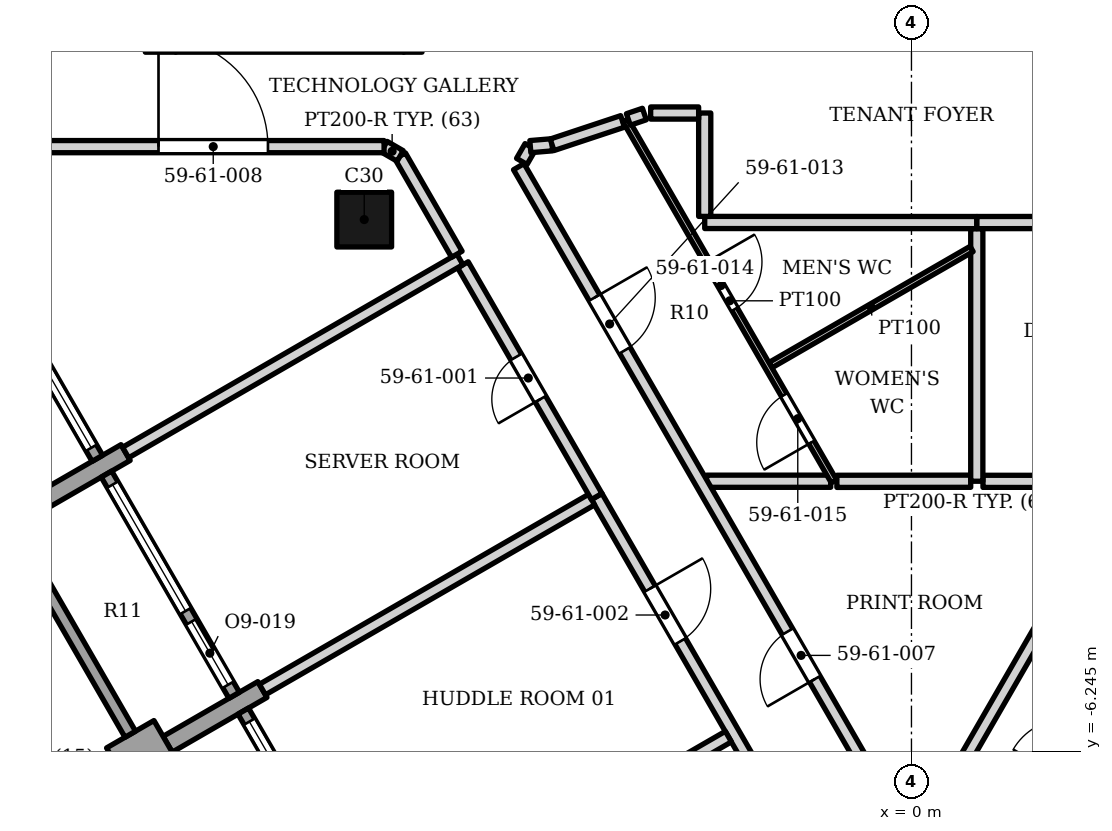
"""IFC4 building model, lengths in metres.
Left out: names, types, materials, properties, quantities, classifications, styles, units other than length and angle.
Written with IfcOpenShell. Run it as: python <this file> out.ifc"""

import sys

from ifc_helpers import new_model, si_unit, direction, frame, frame_2d, origin, origin_2d, place, context, subcontext, project, spatial, rectangle, extrude, element, fill, save


model = new_model("IFC4")
c1 = context("Model", 3, precision=1e-05, world=origin(), true_north=direction((0.0, 1.0)))
c2 = subcontext(c1, "Body", "Model", "MODEL_VIEW")
j1 = project(units=[si_unit("LENGTHUNIT", "METRE"), si_unit("PLANEANGLEUNIT", "RADIAN")], contexts=[c1])
p1 = place(None, origin())
s1 = spatial("IfcSite", under=j1, at=p1, CompositionType="ELEMENT")
p2 = place(p1, origin())
s2 = spatial("IfcBuilding", under=s1, at=p2, CompositionType="ELEMENT")
p3 = place(p2, frame((0.0, 0.0, 248.2)))
s3 = spatial("IfcBuildingStorey", under=s2, at=p3, CompositionType="ELEMENT", Elevation=248.2)
p4 = place(p3, frame((-9.0, 2.5, 0.0), z_axis=(0.0, 0.0, 1.0), x_axis=(1.0, 0.0, 0.0)))
e1 = element("IfcColumn", 1, at=p4, inside=s3, PredefinedType="COLUMN", context=c2, shape_type="SweptSolid", body=[
    extrude(rectangle(XDim=0.9, YDim=0.9, at=origin_2d()), origin(), (0.0, 0.0, 1.0), 3.9),
])
p5 = place(p3, frame((-14.483, -2.231, 0.0), z_axis=(0.0, 0.0, 1.0), x_axis=(0.866047807691, 0.499961193289, 0.0)))
e2 = element("IfcWall", 2, at=p5, inside=s3, PredefinedType="SOLIDWALL", context=c2, shape_type="SweptSolid", body=[
    extrude(rectangle(XDim=1.8, YDim=0.3, at=frame_2d((0.9, 0.0))), origin(), (0.0, 0.0, 1.0), 3.0),
])
p6 = place(p3, frame((-13.012, -6.578, 0.0), z_axis=(0.0, 0.0, 1.0), x_axis=(0.866013897511, 0.50001992892, 0.0)))
e3 = element("IfcWall", 3, at=p6, inside=s3, PredefinedType="SOLIDWALL", context=c2, shape_type="SweptSolid", body=[
    extrude(rectangle(XDim=0.9, YDim=0.9, at=frame_2d((0.45, 0.0))), origin(), (0.0, 0.0, 1.0), 3.0),
])
p7 = place(p3, frame((-12.233, -6.128, 0.0), z_axis=(0.0, 0.0, 1.0), x_axis=(0.865989075817, 0.500062916607, 0.0)))
e4 = element("IfcWall", 4, at=p7, inside=s3, PredefinedType="SOLIDWALL", context=c2, shape_type="SweptSolid", body=[
    extrude(rectangle(XDim=1.8, YDim=0.3, at=frame_2d((0.9, 0.0))), origin(), (0.0, 0.0, 1.0), 3.0),
])
p8 = place(p3, frame((-15.489, 2.211, 0.0), z_axis=(0.0, 0.0, 1.0), x_axis=(0.500027713859, -0.866009402589, 0.0)))
e5 = element("IfcWall", 5, at=p8, inside=s3, PredefinedType="ELEMENTEDWALL", context=c2, shape_type="SweptSolid", body=[
    extrude(rectangle(XDim=4.2, YDim=0.2, at=frame_2d((2.1, 0.0))), origin(), (0.0, 0.0, 1.0), 3.0),
])
p9 = place(p8, frame((0.2, 0.0, 0.45)))
e6 = element("IfcOpeningElement", 6, at=p9, cuts=e5, PredefinedType="OPENING", context=c2, shape_type="SweptSolid", body=[
    extrude(rectangle(XDim=3.8, YDim=2.25, at=frame_2d((1.9, 1.125))), frame((0.0, 0.11, 0.0), z_axis=(0.0, -1.0, 0.0), x_axis=(1.0, 0.0, 0.0)), (0.0, 0.0, 1.0), 0.22),
])
p10 = place(p3, frame((-14.648, -2.846, 0.0), z_axis=(0.0, 0.0, 1.0), x_axis=(0.500012057535, -0.866018442252, 0.0)))
e7 = element("IfcWall", 7, at=p10, inside=s3, PredefinedType="SOLIDWALL", context=c2, shape_type="SweptSolid", body=[
    extrude(rectangle(XDim=3.6, YDim=0.2, at=frame_2d((1.8, 0.0))), origin(), (0.0, 0.0, 1.0), 3.0),
])
p11 = place(p3, frame((-13.239, -1.686, 0.0), z_axis=(0.0, 0.0, 1.0), x_axis=(0.500002543286, -0.866023935413, 0.0)))
e8 = element("IfcWall", 8, at=p11, inside=s3, PredefinedType="ELEMENTEDWALL", context=c2, shape_type="SweptSolid", body=[
    extrude(rectangle(XDim=4.2, YDim=0.2, at=frame_2d((2.1, 0.0))), origin(), (0.0, 0.0, 1.0), 3.0),
])
p12 = place(p11, frame((0.2, 0.0, 0.45)))
e9 = element("IfcOpeningElement", 9, at=p12, cuts=e8, PredefinedType="OPENING", context=c2, shape_type="SweptSolid", body=[
    extrude(rectangle(XDim=2.4, YDim=2.25, at=frame_2d((1.2, 1.125))), frame((0.0, 0.11, 0.0), z_axis=(0.0, -1.0, 0.0), x_axis=(1.0, 0.0, 0.0)), (0.0, 0.0, 1.0), 0.22),
])
p13 = place(p11, frame((2.8, 0.0, 0.0)))
e10 = element("IfcOpeningElement", 10, at=p13, cuts=e8, PredefinedType="OPENING", context=c2, shape_type="SweptSolid", body=[
    extrude(rectangle(XDim=1.2, YDim=2.7, at=frame_2d((0.6, 1.35))), frame((0.0, 0.11, 0.0), z_axis=(0.0, -1.0, 0.0), x_axis=(1.0, 0.0, 0.0)), (0.0, 0.0, 1.0), 0.22),
])
p14 = place(p3, frame((-10.989, -5.583, 0.0), z_axis=(0.0, 0.0, 1.0), x_axis=(0.500027713859, -0.866009402589, 0.0)))
e11 = element("IfcWall", 11, at=p14, inside=s3, PredefinedType="ELEMENTEDWALL", context=c2, shape_type="SweptSolid", body=[
    extrude(rectangle(XDim=4.2, YDim=0.2, at=frame_2d((2.1, 0.0))), origin(), (0.0, 0.0, 1.0), 3.0),
])
p15 = place(p14, frame((0.2, 0.0, 0.45)))
e12 = element("IfcOpeningElement", 12, at=p15, cuts=e11, PredefinedType="OPENING", context=c2, shape_type="SweptSolid", body=[
    extrude(rectangle(XDim=3.8, YDim=2.25, at=frame_2d((1.9, 1.125))), frame((0.0, 0.11, 0.0), z_axis=(0.0, -1.0, 0.0), x_axis=(1.0, 0.0, 0.0)), (0.0, 0.0, 1.0), 0.22),
])
p16 = place(p3, frame((-5.177, -2.054, 0.0), z_axis=(0.0, 0.0, 1.0), x_axis=(0.499987206771, -0.866032789833, 0.0)))
e13 = element("IfcWall", 13, at=p16, inside=s3, PredefinedType="PARTITIONING", context=c2, shape_type="SweptSolid", body=[
    extrude(rectangle(XDim=9.26, YDim=0.2, at=frame_2d((4.63, 0.0))), origin(), (0.0, 0.0, 1.0), 2.884),
])
p17 = place(p16, frame((1.75, 0.0, 0.0)))
e14 = element("IfcOpeningElement", 14, at=p17, cuts=e13, PredefinedType="OPENING", context=c2, shape_type="SweptSolid", body=[
    extrude(rectangle(XDim=1.0, YDim=2.1, at=frame_2d((0.5, 1.05))), frame((0.0, 0.11, 0.0), z_axis=(0.0, -1.0, 0.0), x_axis=(1.0, 0.0, 0.0)), (0.0, 0.0, 1.0), 0.22),
])
p18 = place(p16, frame((6.35, 0.0, 0.0)))
e15 = element("IfcOpeningElement", 15, at=p18, cuts=e13, PredefinedType="OPENING", context=c2, shape_type="SweptSolid", body=[
    extrude(rectangle(XDim=0.8, YDim=2.1, at=frame_2d((0.4, 1.05))), frame((0.0, 0.11, 0.0), z_axis=(0.0, -1.0, 0.0), x_axis=(1.0, 0.0, 0.0)), (0.0, 0.0, 1.0), 0.22),
])
p19 = place(p3, frame((0.217, -7.532, 0.0), z_axis=(0.0, 0.0, 1.0), x_axis=(0.499766665369, 0.866160077691, 0.0)))
e16 = element("IfcWall", 16, at=p19, inside=s3, PredefinedType="PARTITIONING", context=c2, shape_type="SweptSolid", body=[
    extrude(rectangle(XDim=12.588, YDim=0.2, at=frame_2d((6.294, 0.0))), origin(), (0.0, 0.0, 1.0), 2.884),
])
p20 = place(p19, frame((9.201, 0.0, 0.0)))
e17 = element("IfcOpeningElement", 17, at=p20, cuts=e16, PredefinedType="OPENING", context=c2, shape_type="SweptSolid", body=[
    extrude(rectangle(XDim=0.8, YDim=2.1, at=frame_2d((0.4, 1.05))), frame((0.0, 0.11, 0.0), z_axis=(0.0, -1.0, 0.0), x_axis=(1.0, 0.0, 0.0)), (0.0, 0.0, 1.0), 0.22),
])
p21 = place(p3, frame((-8.424, -9.125, 0.0), z_axis=(0.0, 0.0, 1.0), x_axis=(0.866180383398, 0.499731471309, 0.0)))
e18 = element("IfcWall", 18, at=p21, inside=s3, PredefinedType="PARTITIONING", context=c2, shape_type="SweptSolid", body=[
    extrude(rectangle(XDim=6.25, YDim=0.2, at=frame_2d((3.125, 0.0))), origin(), (0.0, 0.0, 1.0), 2.884),
])
p22 = place(p3, frame((1.713, -8.144, 0.0), z_axis=(0.0, 0.0, 1.0), x_axis=(0.499986217557, 0.866033360935, 0.0)))
e19 = element("IfcWall", 19, at=p22, inside=s3, PredefinedType="PARTITIONING", context=c2, shape_type="SweptSolid", body=[
    extrude(rectangle(XDim=4.3, YDim=0.2, at=frame_2d((2.15, 0.0))), origin(), (0.0, 0.0, 1.0), 3.73),
])
p23 = place(p22, frame((1.65, 0.0, 0.0)))
e20 = element("IfcOpeningElement", 20, at=p23, cuts=e19, PredefinedType="OPENING", context=c2, shape_type="SweptSolid", body=[
    extrude(rectangle(XDim=1.0, YDim=2.1, at=frame_2d((0.5, 1.05))), frame((0.0, 0.11, 0.0), z_axis=(0.0, -1.0, 0.0), x_axis=(1.0, 0.0, 0.0)), (0.0, 0.0, 1.0), 0.22),
])
p24 = place(p3, frame((-10.674, -5.229, 0.0), z_axis=(0.0, 0.0, 1.0), x_axis=(0.866163474566, 0.4997607781, 0.0)))
e21 = element("IfcWall", 21, at=p24, inside=s3, PredefinedType="PARTITIONING", context=c2, shape_type="SweptSolid", body=[
    extrude(rectangle(XDim=6.25, YDim=0.2, at=frame_2d((3.125, 0.0))), origin(), (0.0, 0.0, 1.0), 3.052),
])
p25 = place(p3, frame((-7.377, 1.756, 0.0), z_axis=(0.0, 0.0, 1.0), x_axis=(0.50001224981, -0.866018331238, 0.0)))
e22 = element("IfcWall", 22, at=p25, inside=s3, PredefinedType="PARTITIONING", context=c2, shape_type="SweptSolid", body=[
    extrude(rectangle(XDim=4.4, YDim=0.2, at=frame_2d((2.2, 0.0))), origin(), (0.0, 0.0, 1.0), 3.73),
])
p26 = place(p25, frame((1.75, 0.0, 0.0)))
e23 = element("IfcOpeningElement", 23, at=p26, cuts=e22, PredefinedType="OPENING", context=c2, shape_type="SweptSolid", body=[
    extrude(rectangle(XDim=0.8, YDim=2.1, at=frame_2d((0.4, 1.05))), frame((0.0, 0.11, 0.0), z_axis=(0.0, -1.0, 0.0), x_axis=(1.0, 0.0, 0.0)), (0.0, 0.0, 1.0), 0.22),
])
p27 = place(p3, frame((1.176, -1.805, 0.0), z_axis=(0.0, 0.0, 1.0), x_axis=(0.999999709909, -0.000761697276, 0.0)))
e24 = element("IfcWall", 24, at=p27, inside=s3, PredefinedType="PARTITIONING", context=c2, shape_type="SweptSolid", body=[
    extrude(rectangle(XDim=2.244, YDim=0.2, at=frame_2d((1.122, 0.0))), origin(), (0.0, 0.0, 1.0), 3.73),
])
p28 = place(p3, frame((-3.37, -1.803, 0.0), z_axis=(0.0, 0.0, 1.0), x_axis=(0.999999992849, 0.000119588614, 0.0)))
e25 = element("IfcWall", 25, at=p28, inside=s3, PredefinedType="PARTITIONING", context=c2, shape_type="SweptSolid", body=[
    extrude(rectangle(XDim=2.042, YDim=0.2, at=frame_2d((1.021, 0.0))), origin(), (0.0, 0.0, 1.0), 3.73),
])
p29 = place(p3, frame((-1.227, -1.805, 0.0), z_axis=(0.0, 0.0, 1.0), x_axis=(0.999999698604, 0.000776397282, 0.0)))
e26 = element("IfcWall", 26, at=p29, inside=s3, PredefinedType="PARTITIONING", context=c2, shape_type="SweptSolid", body=[
    extrude(rectangle(XDim=2.201, YDim=0.2, at=frame_2d((1.101, 0.0))), origin(), (0.0, 0.0, 1.0), 3.73),
])
p30 = place(p3, frame((1.074, -1.803, 0.0), z_axis=(0.0, 0.0, 1.0), x_axis=(0.0, 1.0, 0.0)))
e27 = element("IfcWall", 27, at=p30, inside=s3, PredefinedType="PARTITIONING", context=c2, shape_type="SweptSolid", body=[
    extrude(rectangle(XDim=4.154, YDim=0.2, at=frame_2d((2.077, 0.0))), origin(), (0.0, 0.0, 1.0), 3.73),
])
p31 = place(p3, frame((-12.925, -1.331, 0.0), z_axis=(0.0, 0.0, 1.0), x_axis=(0.865907634831, 0.500203926355, 0.0)))
e28 = element("IfcWall", 28, at=p31, inside=s3, PredefinedType="PARTITIONING", context=c2, shape_type="SweptSolid", body=[
    extrude(rectangle(XDim=6.349, YDim=0.2, at=frame_2d((3.175, 0.0))), origin(), (0.0, 0.0, 1.0), 3.052),
])
p32 = place(p3, frame((-8.409, 3.546, 0.0), z_axis=(0.0, 0.0, 1.0), x_axis=(0.499446790572, -0.866344563893, 0.0)))
e29 = element("IfcWall", 29, at=p32, inside=s3, PredefinedType="PARTITIONING", context=c2, shape_type="SweptSolid", body=[
    extrude(rectangle(XDim=1.866, YDim=0.2, at=frame_2d((0.933, 0.0))), origin(), (0.0, 0.0, 1.0), 3.73),
])
p33 = place(p3, frame((-2.32, 0.106, 0.0), z_axis=(0.0, 0.0, 1.0), x_axis=(0.866013238859, 0.500021069677, 0.0)))
e30 = element("IfcWall", 30, at=p33, inside=s3, PredefinedType="PARTITIONING", context=c2, shape_type="SweptSolid", body=[
    extrude(rectangle(XDim=3.822, YDim=0.1, at=frame_2d((1.911, 0.0))), origin(), (0.0, 0.0, 1.0), 2.884),
])
p34 = place(p3, frame((-3.4, 2.452, 0.0), z_axis=(0.0, 0.0, 1.0), x_axis=(0.999999927065, -0.000381929261, 0.0)))
e31 = element("IfcWall", 31, at=p34, inside=s3, PredefinedType="PARTITIONING", context=c2, shape_type="SweptSolid", body=[
    extrude(rectangle(XDim=4.475, YDim=0.2, at=frame_2d((2.237, 0.0))), origin(), (0.0, 0.0, 1.0), 3.73),
])
p35 = place(p3, frame((1.076, 2.451, 0.0), z_axis=(0.0, 0.0, 1.0), x_axis=(0.999999729558, 0.000735448425, 0.0)))
e32 = element("IfcWall", 32, at=p35, inside=s3, PredefinedType="PARTITIONING", context=c2, shape_type="SweptSolid", body=[
    extrude(rectangle(XDim=2.324, YDim=0.2, at=frame_2d((1.162, 0.0))), origin(), (0.0, 0.0, 1.0), 3.73),
])
p36 = place(p3, frame((-3.4, 4.252, 0.0), z_axis=(0.0, 0.0, 1.0), x_axis=(0.0, -1.0, 0.0)))
e33 = element("IfcWall", 33, at=p36, inside=s3, PredefinedType="PARTITIONING", context=c2, shape_type="SweptSolid", body=[
    extrude(rectangle(XDim=1.7, YDim=0.2, at=frame_2d((0.85, 0.0))), origin(), (0.0, 0.0, 1.0), 3.73),
])
p37 = place(p3, frame((-6.458, 3.37, 0.0), z_axis=(0.0, 0.0, 1.0), x_axis=(0.500262411632, -0.86587384734, 0.0)))
e34 = element("IfcWall", 34, at=p37, inside=s3, PredefinedType="PARTITIONING", context=c2, shape_type="SweptSolid", body=[
    extrude(rectangle(XDim=12.589, YDim=0.2, at=frame_2d((6.294, 0.0))), origin(), (0.0, 0.0, 1.0), 2.884),
])
p38 = place(p37, frame((8.832, 0.0, 0.0)))
e35 = element("IfcOpeningElement", 35, at=p38, cuts=e34, PredefinedType="OPENING", context=c2, shape_type="SweptSolid", body=[
    extrude(rectangle(XDim=0.9, YDim=2.1, at=frame_2d((0.45, 1.05))), frame((0.0, 0.11, 0.0), z_axis=(0.0, -1.0, 0.0), x_axis=(1.0, 0.0, 0.0)), (0.0, 0.0, 1.0), 0.22),
])
p39 = place(p37, frame((2.488, 0.0, 0.0)))
e36 = element("IfcOpeningElement", 36, at=p39, cuts=e34, PredefinedType="OPENING", context=c2, shape_type="SweptSolid", body=[
    extrude(rectangle(XDim=1.0, YDim=2.1, at=frame_2d((0.5, 1.05))), frame((0.0, 0.11, 0.0), z_axis=(0.0, -1.0, 0.0), x_axis=(1.0, 0.0, 0.0)), (0.0, 0.0, 1.0), 0.22),
])
p40 = place(p3, frame((-8.674, 3.699, 0.0), z_axis=(0.0, 0.0, 1.0), x_axis=(0.865826662844, -0.500344071524, 0.0)))
e37 = element("IfcWall", 37, at=p40, inside=s3, PredefinedType="PARTITIONING", context=c2, shape_type="SweptSolid", body=[
    extrude(rectangle(XDim=0.306, YDim=0.2, at=frame_2d((0.153, 0.0))), origin(), (0.0, 0.0, 1.0), 3.73),
])
p41 = place(p3, frame((-14.293, 3.699, 0.0), z_axis=(0.0, 0.0, 1.0), x_axis=(1.0, 0.0, 0.0)))
e38 = element("IfcWall", 38, at=p41, inside=s3, PredefinedType="PARTITIONING", context=c2, shape_type="SweptSolid", body=[
    extrude(rectangle(XDim=5.619, YDim=0.2, at=frame_2d((2.81, 0.0))), origin(), (0.0, 0.0, 1.0), 3.202),
])
p42 = place(p41, frame((1.91, 0.0, 0.0)))
e39 = element("IfcOpeningElement", 39, at=p42, cuts=e38, PredefinedType="OPENING", context=c2, shape_type="SweptSolid", body=[
    extrude(rectangle(XDim=1.8, YDim=2.4, at=frame_2d((0.9, 1.2))), frame((0.0, 0.11, 0.0), z_axis=(0.0, -1.0, 0.0), x_axis=(1.0, 0.0, 0.0)), (0.0, 0.0, 1.0), 0.22),
])
p43 = place(p3, frame((-6.408, 3.457, 0.0), z_axis=(0.0, 0.0, 1.0), x_axis=(0.499973348067, 0.866040790738, 0.0)))
e40 = element("IfcWall", 40, at=p43, inside=s3, PredefinedType="PARTITIONING", context=c2, shape_type="SweptSolid", body=[
    extrude(rectangle(XDim=0.281, YDim=0.2, at=frame_2d((0.14, 0.0))), origin(), (0.0, 0.0, 1.0), 3.73),
])
p44 = place(p3, frame((-6.268, 3.7, 0.0), z_axis=(0.0, 0.0, 1.0), x_axis=(0.996441862788, 0.084282940645, 0.0)))
e41 = element("IfcWall", 41, at=p44, inside=s3, PredefinedType="PARTITIONING", context=c2, shape_type="SweptSolid", body=[
    extrude(rectangle(XDim=0.359, YDim=0.2, at=frame_2d((0.18, 0.0))), origin(), (0.0, 0.0, 1.0), 3.73),
])
p45 = place(p3, frame((-5.91, 3.73, 0.0), z_axis=(0.0, 0.0, 1.0), x_axis=(0.949201798451, 0.314667992999, 0.0)))
e42 = element("IfcWall", 42, at=p45, inside=s3, PredefinedType="PARTITIONING", context=c2, shape_type="SweptSolid", body=[
    extrude(rectangle(XDim=1.221, YDim=0.2, at=frame_2d((0.611, 0.0))), origin(), (0.0, 0.0, 1.0), 3.73),
])
p46 = place(p3, frame((-4.702, 4.132, 0.0), z_axis=(0.0, 0.0, 1.0), x_axis=(0.499966025771, -0.866045017926, 0.0)))
e43 = element("IfcWall", 43, at=p46, inside=s3, PredefinedType="PARTITIONING", context=c2, shape_type="SweptSolid", body=[
    extrude(rectangle(XDim=6.854, YDim=0.1, at=frame_2d((3.427, 0.0))), origin(), (0.0, 0.0, 1.0), 2.884),
])
p47 = place(p46, frame((2.688, 0.0, 0.0)))
e44 = element("IfcOpeningElement", 44, at=p47, cuts=e43, PredefinedType="OPENING", context=c2, shape_type="SweptSolid", body=[
    extrude(rectangle(XDim=0.9, YDim=2.1, at=frame_2d((0.45, 1.05))), frame((0.0, 0.06, 0.0), z_axis=(0.0, -1.0, 0.0), x_axis=(1.0, 0.0, 0.0)), (0.0, 0.0, 1.0), 0.12),
])
p48 = place(p46, frame((5.216, 0.0, 0.0)))
e45 = element("IfcOpeningElement", 45, at=p48, cuts=e43, PredefinedType="OPENING", context=c2, shape_type="SweptSolid", body=[
    extrude(rectangle(XDim=0.9, YDim=2.1, at=frame_2d((0.45, 1.05))), frame((0.0, 0.06, 0.0), z_axis=(0.0, -1.0, 0.0), x_axis=(1.0, 0.0, 0.0)), (0.0, 0.0, 1.0), 0.12),
])
p49 = place(p3, frame((-4.656, 4.146, 0.0), z_axis=(0.0, 0.0, 1.0), x_axis=(0.947002540531, 0.321226070282, 0.0)))
e46 = element("IfcWall", 46, at=p49, inside=s3, PredefinedType="PARTITIONING", context=c2, shape_type="SweptSolid", body=[
    extrude(rectangle(XDim=0.278, YDim=0.2, at=frame_2d((0.139, 0.0))), origin(), (0.0, 0.0, 1.0), 2.884),
])
p50 = place(p3, frame((-4.289, 4.252, 0.0), z_axis=(0.0, 0.0, 1.0), x_axis=(1.0, 0.0, 0.0)))
e47 = element("IfcWall", 47, at=p50, inside=s3, PredefinedType="PARTITIONING", context=c2, shape_type="SweptSolid", body=[
    extrude(rectangle(XDim=0.789, YDim=0.2, at=frame_2d((0.395, 0.0))), origin(), (0.0, 0.0, 1.0), 3.73),
])
p51 = place(p9, origin())
e48 = element("IfcWindow", 48, at=p51, inside=s3, PartitioningType="SINGLE_PANEL", PredefinedType="WINDOW", context=c2, shape_type="SweptSolid", body=[
    extrude(rectangle(XDim=3.8, YDim=2.25, at=frame_2d((1.9, 1.125))), frame((0.0, 0.03, 0.0), z_axis=(0.0, -1.0, 0.0), x_axis=(1.0, 0.0, 0.0)), (0.0, 0.0, 1.0), 0.06),
])
fill(e6, e48)
p52 = place(p12, origin())
e49 = element("IfcWindow", 49, at=p52, inside=s3, PartitioningType="SINGLE_PANEL", PredefinedType="WINDOW", context=c2, shape_type="SweptSolid", body=[
    extrude(rectangle(XDim=2.4, YDim=2.25, at=frame_2d((1.2, 1.125))), frame((0.0, 0.03, 0.0), z_axis=(0.0, -1.0, 0.0), x_axis=(1.0, 0.0, 0.0)), (0.0, 0.0, 1.0), 0.06),
])
fill(e9, e49)
p53 = place(p13, origin())
e50 = element("IfcDoor", 50, at=p53, inside=s3, OperationType="SINGLE_SWING_LEFT", PredefinedType="DOOR", context=c2, shape_type="SweptSolid", body=[
    extrude(rectangle(XDim=1.2, YDim=2.7, at=frame_2d((0.6, 1.35))), frame((0.0, 0.025, 0.0), z_axis=(0.0, -1.0, 0.0), x_axis=(1.0, 0.0, 0.0)), (0.0, 0.0, 1.0), 0.05),
])
fill(e10, e50)
p54 = place(p15, origin())
e51 = element("IfcWindow", 51, at=p54, inside=s3, PartitioningType="SINGLE_PANEL", PredefinedType="WINDOW", context=c2, shape_type="SweptSolid", body=[
    extrude(rectangle(XDim=3.8, YDim=2.25, at=frame_2d((1.9, 1.125))), frame((0.0, 0.03, 0.0), z_axis=(0.0, -1.0, 0.0), x_axis=(1.0, 0.0, 0.0)), (0.0, 0.0, 1.0), 0.06),
])
fill(e12, e51)
p55 = place(p26, origin())
e52 = element("IfcDoor", 52, at=p55, inside=s3, OperationType="SINGLE_SWING_RIGHT", PredefinedType="DOOR", context=c2, shape_type="SweptSolid", body=[
    extrude(rectangle(XDim=0.8, YDim=2.1, at=frame_2d((0.4, 1.05))), frame((0.0, 0.025, 0.0), z_axis=(0.0, -1.0, 0.0), x_axis=(1.0, 0.0, 0.0)), (0.0, 0.0, 1.0), 0.05),
])
fill(e23, e52)
p56 = place(p17, origin())
e53 = element("IfcDoor", 53, at=p56, inside=s3, OperationType="SINGLE_SWING_LEFT", PredefinedType="DOOR", context=c2, shape_type="SweptSolid", body=[
    extrude(rectangle(XDim=1.0, YDim=2.1, at=frame_2d((0.5, 1.05))), frame((0.0, 0.025, 0.0), z_axis=(0.0, -1.0, 0.0), x_axis=(1.0, 0.0, 0.0)), (0.0, 0.0, 1.0), 0.05),
])
fill(e14, e53)
p57 = place(p38, origin())
e54 = element("IfcDoor", 54, at=p57, inside=s3, OperationType="SINGLE_SWING_RIGHT", PredefinedType="DOOR", context=c2, shape_type="SweptSolid", body=[
    extrude(rectangle(XDim=0.9, YDim=2.1, at=frame_2d((0.45, 1.05))), frame((0.0, 0.025, 0.0), z_axis=(0.0, -1.0, 0.0), x_axis=(1.0, 0.0, 0.0)), (0.0, 0.0, 1.0), 0.05),
])
fill(e35, e54)
p58 = place(p42, origin())
e55 = element("IfcDoor", 55, at=p58, inside=s3, OperationType="DOUBLE_DOOR_SINGLE_SWING", PredefinedType="DOOR", context=c2, shape_type="SweptSolid", body=[
    extrude(rectangle(XDim=1.8, YDim=2.4, at=frame_2d((0.9, 1.2))), frame((0.0, 0.025, 0.0), z_axis=(0.0, -1.0, 0.0), x_axis=(1.0, 0.0, 0.0)), (0.0, 0.0, 1.0), 0.05),
])
fill(e39, e55)
p59 = place(p39, origin())
e56 = element("IfcDoor", 56, at=p59, inside=s3, OperationType="SINGLE_SWING_LEFT", PredefinedType="DOOR", context=c2, shape_type="SweptSolid", body=[
    extrude(rectangle(XDim=1.0, YDim=2.1, at=frame_2d((0.5, 1.05))), frame((0.0, 0.025, 0.0), z_axis=(0.0, -1.0, 0.0), x_axis=(1.0, 0.0, 0.0)), (0.0, 0.0, 1.0), 0.05),
])
fill(e36, e56)
p60 = place(p47, origin())
e57 = element("IfcDoor", 57, at=p60, inside=s3, OperationType="SINGLE_SWING_LEFT", PredefinedType="DOOR", context=c2, shape_type="SweptSolid", body=[
    extrude(rectangle(XDim=0.9, YDim=2.1, at=frame_2d((0.45, 1.05))), frame((0.0, 0.025, 0.0), z_axis=(0.0, -1.0, 0.0), x_axis=(1.0, 0.0, 0.0)), (0.0, 0.0, 1.0), 0.05),
])
fill(e44, e57)
p61 = place(p48, origin())
e58 = element("IfcDoor", 58, at=p61, inside=s3, OperationType="SINGLE_SWING_RIGHT", PredefinedType="DOOR", context=c2, shape_type="SweptSolid", body=[
    extrude(rectangle(XDim=0.9, YDim=2.1, at=frame_2d((0.45, 1.05))), frame((0.0, 0.025, 0.0), z_axis=(0.0, -1.0, 0.0), x_axis=(1.0, 0.0, 0.0)), (0.0, 0.0, 1.0), 0.05),
])
fill(e45, e58)
save(model, sys.argv[1])
